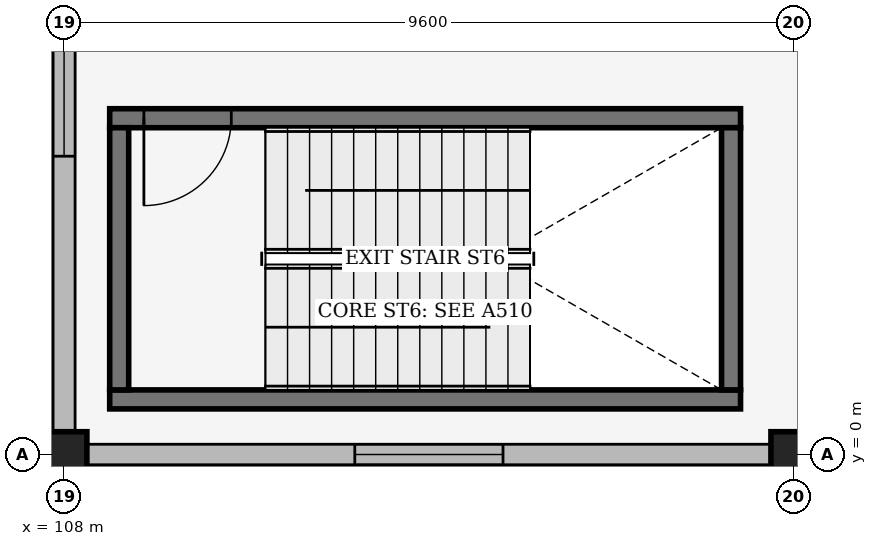
"""IFC4 building model, lengths in metres.
Left out: names, types, materials, properties, quantities, classifications, styles, units other than length and angle.
Written with IfcOpenShell. Run it as: python <this file> out.ifc"""

import sys

from ifc_helpers import new_model, si_unit, direction, frame, frame_2d, origin, origin_2d, place, context, subcontext, project, spatial, rectangle, extrude, element, fill, save


model = new_model("IFC4")
c1 = context("Model", 3, precision=1e-05, world=origin(), true_north=direction((0.0, 1.0)))
c2 = subcontext(c1, "Body", "Model", "MODEL_VIEW")
j1 = project(units=[si_unit("LENGTHUNIT", "METRE"), si_unit("PLANEANGLEUNIT", "RADIAN")], contexts=[c1])
p1 = place(None, origin())
s1 = spatial("IfcSite", under=j1, at=p1, CompositionType="ELEMENT")
p2 = place(p1, origin())
s2 = spatial("IfcBuilding", under=s1, at=p2, CompositionType="ELEMENT")
p3 = place(p2, frame((0.0, 0.0, 10.5)))
s3 = spatial("IfcBuildingStorey", under=s2, at=p3, CompositionType="ELEMENT", Elevation=10.5)
for number, where, z_axis, x_axis in (
    (1, (108.0, 0.0, 0.0), (0.0, 0.0, 1.0), (1.0, 0.0, 0.0)),
    (2, (117.6, 0.0, 0.0), (0.0, 0.0, 1.0), (1.0, 0.0, 0.0)),
):
    element("IfcColumn", number, at=place(p3, frame(where, z_axis=z_axis, x_axis=x_axis)), inside=s3, PredefinedType="COLUMN", context=c2, shape_type="SweptSolid", body=[
        extrude(rectangle(XDim=0.6, YDim=0.6, at=origin_2d()), origin(), (0.0, 0.0, 1.0), 4.8),
    ])
p4 = place(p3, frame((108.0, 9.292, 0.0), z_axis=(0.0, 0.0, 1.0), x_axis=(0.0, -1.0, 0.0)))
e3 = element("IfcWall", 3, at=p4, inside=s3, PredefinedType="SOLIDWALL", context=c2, shape_type="SweptSolid", body=[
    extrude(rectangle(XDim=8.984, YDim=0.29, at=frame_2d((4.492, 0.0))), origin(), (0.0, 0.0, 1.0), 3.874),
])
p5 = place(p4, frame((3.617, 0.0, 0.95)))
e4 = element("IfcOpeningElement", 4, at=p5, cuts=e3, PredefinedType="OPENING", context=c2, shape_type="SweptSolid", body=[
    extrude(rectangle(XDim=1.75, YDim=2.1, at=frame_2d((0.875, 1.05))), frame((0.0, 0.155, 0.0), z_axis=(0.0, -1.0, 0.0), x_axis=(1.0, 0.0, 0.0)), (0.0, 0.0, 1.0), 0.31),
])
p6 = place(p3, frame((108.308, 0.0, 0.0), z_axis=(0.0, 0.0, 1.0), x_axis=(1.0, 0.0, 0.0)))
e5 = element("IfcWall", 5, at=p6, inside=s3, PredefinedType="SOLIDWALL", context=c2, shape_type="SweptSolid", body=[
    extrude(rectangle(XDim=8.984, YDim=0.27, at=frame_2d((4.492, 0.0))), origin(), (0.0, 0.0, 1.0), 4.178),
])
p7 = place(p6, frame((3.517, 0.0, 0.95)))
e6 = element("IfcOpeningElement", 6, at=p7, cuts=e5, PredefinedType="OPENING", context=c2, shape_type="SweptSolid", body=[
    extrude(rectangle(XDim=1.95, YDim=1.2, at=frame_2d((0.975, 0.6))), frame((0.0, 0.145, 0.0), z_axis=(0.0, -1.0, 0.0), x_axis=(1.0, 0.0, 0.0)), (0.0, 0.0, 1.0), 0.29),
])
p8 = place(p3, frame((108.6, 0.725, 0.0), z_axis=(0.0, 0.0, 1.0), x_axis=(1.0, 0.0, 0.0)))
e7 = element("IfcWall", 7, at=p8, inside=s3, PredefinedType="SHEAR", context=c2, shape_type="SweptSolid", body=[
    extrude(rectangle(XDim=8.3, YDim=0.25, at=frame_2d((4.15, 0.0))), origin(), (0.0, 0.0, 1.0), 4.52),
])
p9 = place(p3, frame((116.9, 4.425, 0.0), z_axis=(0.0, 0.0, 1.0), x_axis=(-1.0, 0.0, 0.0)))
e8 = element("IfcWall", 8, at=p9, inside=s3, PredefinedType="SHEAR", context=c2, shape_type="SweptSolid", body=[
    extrude(rectangle(XDim=8.3, YDim=0.25, at=frame_2d((4.15, 0.0))), origin(), (0.0, 0.0, 1.0), 4.52),
])
p10 = place(p9, frame((7.85, 0.0, 0.0), z_axis=(0.0, 0.0, 1.0), x_axis=(-1.0, 0.0, 0.0)))
e9 = element("IfcOpeningElement", 9, at=p10, cuts=e8, PredefinedType="OPENING", context=c2, shape_type="SweptSolid", body=[
    extrude(rectangle(XDim=1.15, YDim=2.2, at=frame_2d((0.575, 1.1))), frame((0.0, 0.135, 0.0), z_axis=(0.0, -1.0, 0.0), x_axis=(1.0, 0.0, 0.0)), (0.0, 0.0, 1.0), 0.27),
])
for number, where, z_axis, x_axis in (
    (10, (108.725, 4.3, 0.0), (0.0, 0.0, 1.0), (0.0, -1.0, 0.0)),
    (11, (116.775, 0.85, 0.0), (0.0, 0.0, 1.0), (0.0, 1.0, 0.0)),
):
    element("IfcWall", number, at=place(p3, frame(where, z_axis=z_axis, x_axis=x_axis)), inside=s3, PredefinedType="SHEAR", context=c2, shape_type="SweptSolid", body=[
        extrude(rectangle(XDim=3.45, YDim=0.25, at=frame_2d((1.725, 0.0))), origin(), (0.0, 0.0, 1.0), 4.52),
    ])
p11 = place(p5, origin())
e12 = element("IfcWindow", 12, at=p11, inside=s3, PartitioningType="SINGLE_PANEL", PredefinedType="WINDOW", context=c2, shape_type="SweptSolid", body=[
    extrude(rectangle(XDim=1.75, YDim=2.1, at=frame_2d((0.875, 1.05))), frame((0.0, 0.03, 0.0), z_axis=(0.0, -1.0, 0.0), x_axis=(1.0, 0.0, 0.0)), (0.0, 0.0, 1.0), 0.06),
])
fill(e4, e12)
p12 = place(p7, origin())
e13 = element("IfcWindow", 13, at=p12, inside=s3, PartitioningType="SINGLE_PANEL", PredefinedType="WINDOW", context=c2, shape_type="SweptSolid", body=[
    extrude(rectangle(XDim=1.95, YDim=1.2, at=frame_2d((0.975, 0.6))), frame((0.0, 0.03, 0.0), z_axis=(0.0, -1.0, 0.0), x_axis=(1.0, 0.0, 0.0)), (0.0, 0.0, 1.0), 0.06),
])
fill(e6, e13)
p13 = place(p10, origin())
e14 = element("IfcDoor", 14, at=p13, inside=s3, OperationType="SINGLE_SWING_LEFT", PredefinedType="DOOR", context=c2, shape_type="SweptSolid", body=[
    extrude(rectangle(XDim=1.15, YDim=2.2, at=frame_2d((0.575, 1.1))), frame((0.0, 0.025, 0.0), z_axis=(0.0, -1.0, 0.0), x_axis=(1.0, 0.0, 0.0)), (0.0, 0.0, 1.0), 0.05),
])
fill(e9, e14)
save(model, sys.argv[1])
